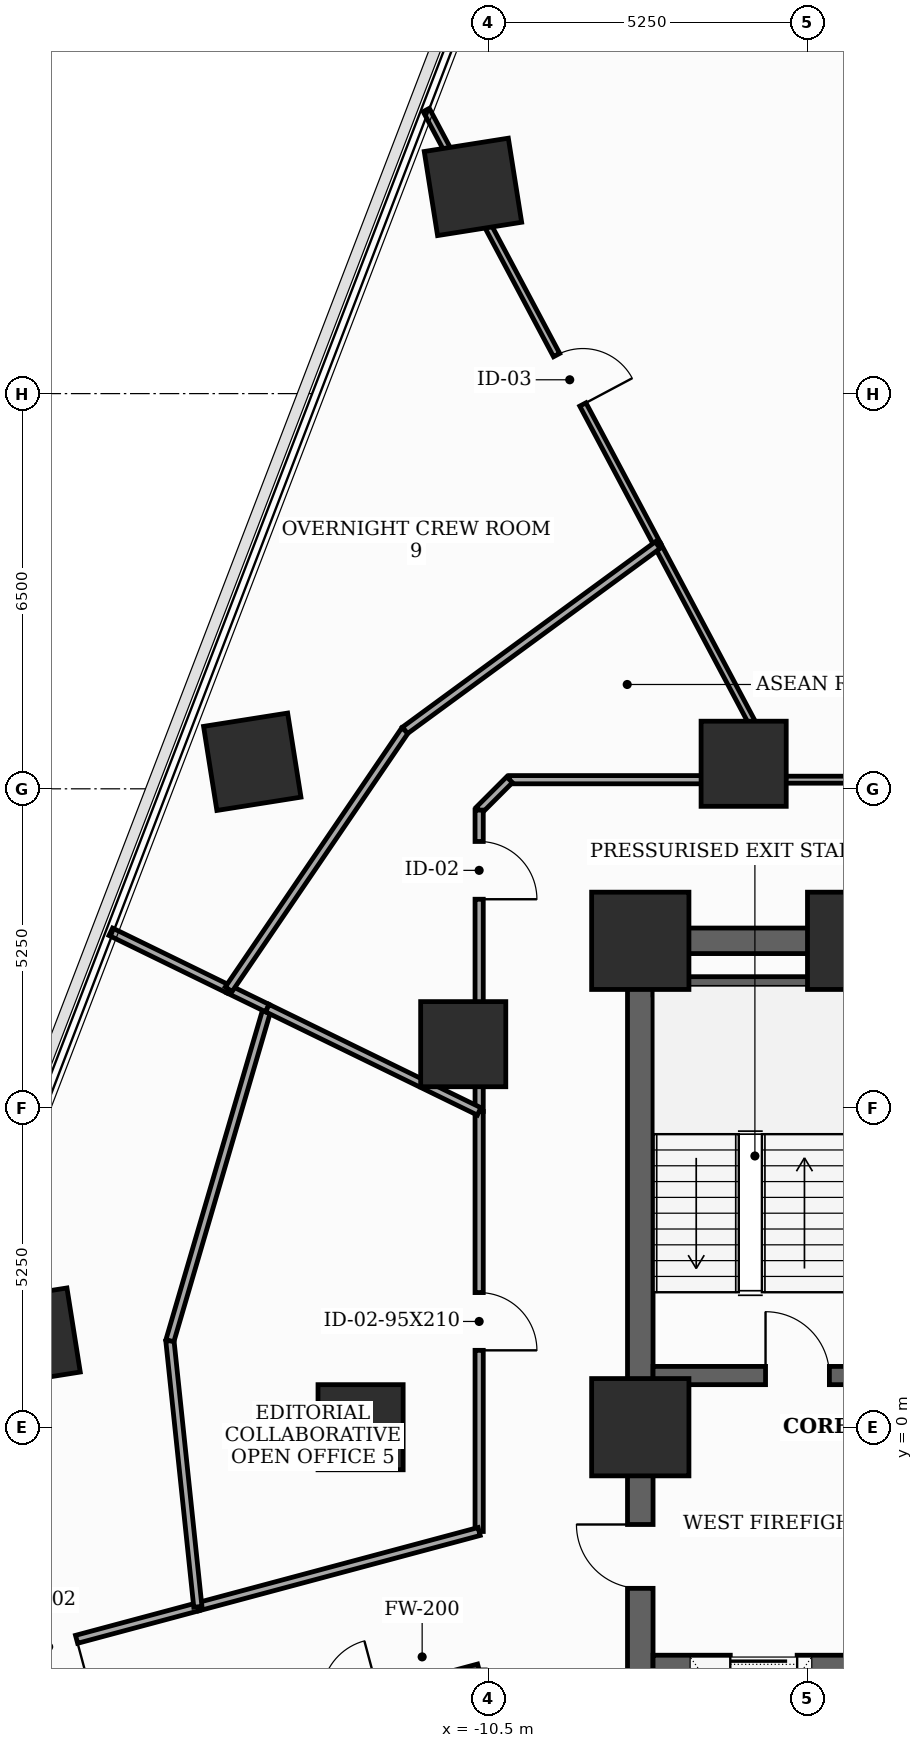
"""IFC4 building model, lengths in metres.
Left out: names, types, materials, properties, quantities, classifications, styles, units other than length and angle.
Written with IfcOpenShell. Run it as: python <this file> out.ifc"""

import sys

from ifc_helpers import new_model, si_unit, direction, frame, frame_2d, origin, origin_2d, place, context, subcontext, project, spatial, rectangle, extrude, element, fill, save


model = new_model("IFC4")
c1 = context("Model", 3, precision=1e-05, world=origin(), true_north=direction((0.0, 1.0)))
c2 = subcontext(c1, "Body", "Model", "MODEL_VIEW")
j1 = project(units=[si_unit("LENGTHUNIT", "METRE"), si_unit("PLANEANGLEUNIT", "RADIAN")], contexts=[c1])
p1 = place(None, origin())
s1 = spatial("IfcSite", under=j1, at=p1, CompositionType="ELEMENT")
p2 = place(p1, origin())
s2 = spatial("IfcBuilding", under=s1, at=p2, CompositionType="ELEMENT")
p3 = place(p2, frame((0.0, 0.0, 81.5)))
s3 = spatial("IfcBuildingStorey", under=s2, at=p3, CompositionType="ELEMENT", Elevation=81.5)
for number, where, z_axis, x_axis in (
    (1, (-4.45, 8.0, 0.0), (0.0, 0.0, 1.0), (1.0, 0.0, 0.0)),
    (2, (-8.0, 8.0, 0.0), (0.0, 0.0, 1.0), (1.0, 0.0, 0.0)),
    (3, (-8.0, 0.0, 0.0), (0.0, 0.0, 1.0), (1.0, 0.0, 0.0)),
):
    element("IfcColumn", number, at=place(p3, frame(where, z_axis=z_axis, x_axis=x_axis)), inside=s3, PredefinedType="COLUMN", context=c2, shape_type="SweptSolid", body=[
        extrude(rectangle(XDim=1.6, YDim=1.6, at=origin_2d()), origin(), (0.0, 0.0, 1.0), 3.7),
    ])
for number, where, z_axis, x_axis in (
    (4, (-6.3, 10.912, 0.0), (0.0, 0.0, 1.0), (1.0, 0.0, 0.0)),
    (5, (-10.912, 6.3, 0.0), (0.0, 0.0, 1.0), (1.0, 0.0, 0.0)),
    (6, (-12.6, 0.0, 0.0), (0.0, 0.0, 1.0), (1.0, 0.0, 0.0)),
    (7, (-10.752, 20.4, 0.0), (0.0, 0.0, 1.0), (0.988, 0.156, 0.0)),
    (8, (-14.381, 10.945, 0.0), (0.0, 0.0, 1.0), (0.988, 0.156, 0.0)),
    (9, (-18.011, 1.49, 0.0), (0.0, 0.0, 1.0), (0.988, 0.156, 0.0)),
):
    element("IfcColumn", number, at=place(p3, frame(where, z_axis=z_axis, x_axis=x_axis)), inside=s3, PredefinedType="COLUMN", context=c2, shape_type="SweptSolid", body=[
        extrude(rectangle(XDim=1.4, YDim=1.4, at=origin_2d()), origin(), (0.0, 0.0, 1.0), 3.7),
    ])
p4 = place(p3, frame((-8.0, -8.0, 0.0), z_axis=(0.0, 0.0, 1.0), x_axis=(0.0, 1.0, 0.0)))
e10 = element("IfcWall", 10, at=p4, inside=s3, PredefinedType="SHEAR", context=c2, shape_type="SweptSolid", body=[
    extrude(rectangle(XDim=16.0, YDim=0.42, at=frame_2d((8.0, 0.0))), origin(), (0.0, 0.0, 1.0), 3.46),
])
p5 = place(p4, frame((1.002, 0.0, 0.0)))
e11 = element("IfcOpeningElement", 11, at=p5, cuts=e10, PredefinedType="OPENING", context=c2, shape_type="SweptSolid", body=[
    extrude(rectangle(XDim=0.85, YDim=2.02, at=frame_2d((0.425, 1.01))), frame((0.0, 0.22, 0.0), z_axis=(0.0, -1.0, 0.0), x_axis=(1.0, 0.0, 0.0)), (0.0, 0.0, 1.0), 0.44),
])
p6 = place(p4, frame((5.35, 0.0, 0.0)))
e12 = element("IfcOpeningElement", 12, at=p6, cuts=e10, PredefinedType="OPENING", context=c2, shape_type="SweptSolid", body=[
    extrude(rectangle(XDim=1.05, YDim=2.15, at=frame_2d((0.525, 1.075))), frame((0.0, 0.22, 0.0), z_axis=(0.0, -1.0, 0.0), x_axis=(1.0, 0.0, 0.0)), (0.0, 0.0, 1.0), 0.44),
])
p7 = place(p3, frame((-8.0, 8.0, 0.0), z_axis=(0.0, 0.0, 1.0), x_axis=(1.0, 0.0, 0.0)))
e13 = element("IfcWall", 13, at=p7, inside=s3, PredefinedType="SHEAR", context=c2, shape_type="SweptSolid", body=[
    extrude(rectangle(XDim=16.0, YDim=0.42, at=frame_2d((8.0, 0.0))), origin(), (0.0, 0.0, 1.0), 3.46),
])
p8 = place(p7, frame((7.1, 0.0, 0.0)))
e14 = element("IfcOpeningElement", 14, at=p8, cuts=e13, PredefinedType="OPENING", context=c2, shape_type="SweptSolid", body=[
    extrude(rectangle(XDim=1.8, YDim=2.15, at=frame_2d((0.9, 1.075))), frame((0.0, 0.22, 0.0), z_axis=(0.0, -1.0, 0.0), x_axis=(1.0, 0.0, 0.0)), (0.0, 0.0, 1.0), 0.44),
])
p9 = place(p3, frame((-7.79, 0.85, 0.0), z_axis=(0.0, 0.0, 1.0), x_axis=(1.0, 0.0, 0.0)))
e15 = element("IfcWall", 15, at=p9, inside=s3, PredefinedType="SHEAR", context=c2, shape_type="SweptSolid", body=[
    extrude(rectangle(XDim=3.34, YDim=0.3, at=frame_2d((1.67, 0.0))), origin(), (0.0, 0.0, 1.0), 3.46),
])
p10 = place(p9, frame((1.85, 0.0, 0.0)))
e16 = element("IfcOpeningElement", 16, at=p10, cuts=e15, PredefinedType="OPENING", context=c2, shape_type="SweptSolid", body=[
    extrude(rectangle(XDim=1.05, YDim=2.15, at=frame_2d((0.525, 1.075))), frame((0.0, 0.16, 0.0), z_axis=(0.0, -1.0, 0.0), x_axis=(1.0, 0.0, 0.0)), (0.0, 0.0, 1.0), 0.32),
])
p11 = place(p3, frame((-7.79, 7.26, 0.0), z_axis=(0.0, 0.0, 1.0), x_axis=(1.0, 0.0, 0.0)))
e17 = element("IfcWall", 17, at=p11, inside=s3, PredefinedType="SHEAR", context=c2, shape_type="SweptSolid", body=[
    extrude(rectangle(XDim=3.34, YDim=0.3, at=frame_2d((1.67, 0.0))), origin(), (0.0, 0.0, 1.0), 3.46),
])
p12 = place(p3, frame((-7.79, -3.9, 0.0), z_axis=(0.0, 0.0, 1.0), x_axis=(1.0, 0.0, 0.0)))
e18 = element("IfcWall", 18, at=p12, inside=s3, PredefinedType="SHEAR", context=c2, shape_type="SweptSolid", body=[
    extrude(rectangle(XDim=3.34, YDim=0.3, at=frame_2d((1.67, 0.0))), origin(), (0.0, 0.0, 1.0), 3.46),
])
p13 = place(p12, frame((1.27, 0.0, 0.0)))
e19 = element("IfcOpeningElement", 19, at=p13, cuts=e18, PredefinedType="OPENING", context=c2, shape_type="SweptSolid", body=[
    extrude(rectangle(XDim=1.1, YDim=2.1, at=frame_2d((0.55, 1.05))), frame((0.0, 0.16, 0.0), z_axis=(0.0, -1.0, 0.0), x_axis=(1.0, 0.0, 0.0)), (0.0, 0.0, 1.0), 0.32),
])
p14 = place(p3, frame((1.715, 10.65, 0.0), z_axis=(0.0, 0.0, 1.0), x_axis=(-1.0, 0.0, 0.0)))
e20 = element("IfcWall", 20, at=p14, inside=s3, PredefinedType="PARTITIONING", context=c2, shape_type="SweptSolid", body=[
    extrude(rectangle(XDim=7.378, YDim=0.115, at=frame_2d((3.689, 0.0))), origin(), (0.0, 0.0, 1.0), 2.745),
])
p15 = place(p3, frame((-14.851, -5.118, 0.0), z_axis=(0.0, 0.0, 1.0), x_axis=(0.965909963178, 0.258878239783, 0.0)))
e21 = element("IfcWall", 21, at=p15, inside=s3, PredefinedType="SOLIDWALL", context=c2, shape_type="SweptSolid", body=[
    extrude(rectangle(XDim=4.349, YDim=0.2, at=frame_2d((2.175, 0.0))), origin(), (0.0, 0.0, 1.0), 2.745),
])
p16 = place(p15, frame((1.7, 0.0, 0.0)))
e22 = element("IfcOpeningElement", 22, at=p16, cuts=e21, PredefinedType="OPENING", context=c2, shape_type="SweptSolid", body=[
    extrude(rectangle(XDim=0.95, YDim=2.1, at=frame_2d((0.475, 1.05))), frame((0.0, 0.11, 0.0), z_axis=(0.0, -1.0, 0.0), x_axis=(1.0, 0.0, 0.0)), (0.0, 0.0, 1.0), 0.22),
])
p17 = place(p3, frame((-15.276, -2.954, 0.0), z_axis=(0.0, 0.0, 1.0), x_axis=(-0.965923168362, -0.258828964418, 0.0)))
e23 = element("IfcWall", 23, at=p17, inside=s3, PredefinedType="PARTITIONING", context=c2, shape_type="SweptSolid", body=[
    extrude(rectangle(XDim=5.08, YDim=0.135, at=frame_2d((2.54, 0.0))), origin(), (0.0, 0.0, 1.0), 2.045),
])
p18 = place(p17, frame((2.065, 0.0, 0.0)))
e24 = element("IfcOpeningElement", 24, at=p18, cuts=e23, PredefinedType="OPENING", context=c2, shape_type="SweptSolid", body=[
    extrude(rectangle(XDim=0.95, YDim=2.0, at=frame_2d((0.475, 1.0))), frame((0.0, 0.077, 0.0), z_axis=(0.0, -1.0, 0.0), x_axis=(1.0, 0.0, 0.0)), (0.0, 0.0, 1.0), 0.155),
])
p19 = place(p3, frame((-10.65, 5.194, 0.0), z_axis=(0.0, 0.0, 1.0), x_axis=(0.0, -1.0, 0.0)))
e25 = element("IfcWall", 25, at=p19, inside=s3, PredefinedType="PARTITIONING", context=c2, shape_type="SweptSolid", body=[
    extrude(rectangle(XDim=6.909, YDim=0.135, at=frame_2d((3.455, 0.0))), origin(), (0.0, 0.0, 1.0), 2.745),
])
p20 = place(p19, frame((2.979, 0.0, 0.0)))
e26 = element("IfcOpeningElement", 26, at=p20, cuts=e25, PredefinedType="OPENING", context=c2, shape_type="SweptSolid", body=[
    extrude(rectangle(XDim=0.95, YDim=2.1, at=frame_2d((0.475, 1.05))), frame((0.0, 0.077, 0.0), z_axis=(0.0, -1.0, 0.0), x_axis=(1.0, 0.0, 0.0)), (0.0, 0.0, 1.0), 0.155),
])
p21 = place(p3, frame((-10.65, -1.715, 0.0), z_axis=(0.0, 0.0, 1.0), x_axis=(-0.965952601708, -0.258719097196, 0.0)))
e27 = element("IfcWall", 27, at=p21, inside=s3, PredefinedType="PARTITIONING", context=c2, shape_type="SweptSolid", body=[
    extrude(rectangle(XDim=4.789, YDim=0.135, at=frame_2d((2.395, 0.0))), origin(), (0.0, 0.0, 1.0), 2.745),
])
p22 = place(p3, frame((-5.663, 10.65, 0.0), z_axis=(0.0, 0.0, 1.0), x_axis=(-1.0, 0.0, 0.0)))
e28 = element("IfcWall", 28, at=p22, inside=s3, PredefinedType="PARTITIONING", context=c2, shape_type="SweptSolid", body=[
    extrude(rectangle(XDim=4.487, YDim=0.135, at=frame_2d((2.243, 0.0))), origin(), (0.0, 0.0, 1.0), 2.745),
])
p23 = place(p3, frame((-10.15, 10.65, 0.0), z_axis=(0.0, 0.0, 1.0), x_axis=(-0.707106781187, -0.707106781187, 0.0)))
e29 = element("IfcWall", 29, at=p23, inside=s3, PredefinedType="PARTITIONING", context=c2, shape_type="SweptSolid", body=[
    extrude(rectangle(XDim=0.707, YDim=0.135, at=frame_2d((0.354, 0.0))), origin(), (0.0, 0.0, 1.0), 3.46),
])
p24 = place(p3, frame((-10.65, 10.15, 0.0), z_axis=(0.0, 0.0, 1.0), x_axis=(0.0, -1.0, 0.0)))
e30 = element("IfcWall", 30, at=p24, inside=s3, PredefinedType="PARTITIONING", context=c2, shape_type="SweptSolid", body=[
    extrude(rectangle(XDim=4.956, YDim=0.135, at=frame_2d((2.478, 0.0))), origin(), (0.0, 0.0, 1.0), 2.045),
])
p25 = place(p24, frame((0.516, 0.0, 0.0)))
e31 = element("IfcOpeningElement", 31, at=p25, cuts=e30, PredefinedType="OPENING", context=c2, shape_type="SweptSolid", body=[
    extrude(rectangle(XDim=0.95, YDim=2.0, at=frame_2d((0.475, 1.0))), frame((0.0, 0.077, 0.0), z_axis=(0.0, -1.0, 0.0), x_axis=(1.0, 0.0, 0.0)), (0.0, 0.0, 1.0), 0.155),
])
p26 = place(p3, frame((-11.52, 21.665, 0.0), z_axis=(0.0, 0.0, 1.0), x_axis=(0.469518559383, -0.88292260272, 0.0)))
e32 = element("IfcWall", 32, at=p26, inside=s3, PredefinedType="PARTITIONING", context=c2, shape_type="SweptSolid", body=[
    extrude(rectangle(XDim=8.105, YDim=0.115, at=frame_2d((4.053, 0.0))), origin(), (0.0, 0.0, 1.0), 2.045),
])
p27 = place(p26, frame((4.565, 0.0, 0.0)))
e33 = element("IfcOpeningElement", 33, at=p27, cuts=e32, PredefinedType="OPENING", context=c2, shape_type="SweptSolid", body=[
    extrude(rectangle(XDim=0.92, YDim=2.0, at=frame_2d((0.46, 1.0))), frame((0.0, 0.067, 0.0), z_axis=(0.0, -1.0, 0.0), x_axis=(1.0, 0.0, 0.0)), (0.0, 0.0, 1.0), 0.135),
])
p28 = place(p3, frame((-7.714, 14.508, 0.0), z_axis=(0.0, 0.0, 1.0), x_axis=(0.469401685306, -0.882984743827, 0.0)))
e34 = element("IfcWall", 34, at=p28, inside=s3, PredefinedType="PARTITIONING", context=c2, shape_type="SweptSolid", body=[
    extrude(rectangle(XDim=4.369, YDim=0.115, at=frame_2d((2.185, 0.0))), origin(), (0.0, 0.0, 1.0), 2.045),
])
p29 = place(p3, frame((-15.276, -2.954, 0.0), z_axis=(0.0, 0.0, 1.0), x_axis=(-0.104560622475, 0.994518514774, 0.0)))
e35 = element("IfcWall", 35, at=p29, inside=s3, PredefinedType="PARTITIONING", context=c2, shape_type="SweptSolid", body=[
    extrude(rectangle(XDim=4.401, YDim=0.135, at=frame_2d((2.201, 0.0))), origin(), (0.0, 0.0, 1.0), 2.045),
])
p30 = place(p3, frame((-15.736, 1.423, 0.0), z_axis=(0.0, 0.0, 1.0), x_axis=(0.281231672123, 0.959639904649, 0.0)))
e36 = element("IfcWall", 36, at=p30, inside=s3, PredefinedType="PARTITIONING", context=c2, shape_type="SweptSolid", body=[
    extrude(rectangle(XDim=5.7, YDim=0.135, at=frame_2d((2.85, 0.0))), origin(), (0.0, 0.0, 1.0), 3.46),
])
p31 = place(p3, frame((-14.769, 7.203, 0.0), z_axis=(0.0, 0.0, 1.0), x_axis=(-0.898774971292, 0.438410254191, 0.0)))
e37 = element("IfcWall", 37, at=p31, inside=s3, PredefinedType="PARTITIONING", context=c2, shape_type="SweptSolid", body=[
    extrude(rectangle(XDim=2.157, YDim=0.135, at=frame_2d((1.079, 0.0))), origin(), (0.0, 0.0, 1.0), 2.045),
])
p32 = place(p3, frame((-14.133, 6.893, 0.0), z_axis=(0.0, 0.0, 1.0), x_axis=(-0.899003804691, 0.437940816949, 0.0)))
e38 = element("IfcWall", 38, at=p32, inside=s3, PredefinedType="PARTITIONING", context=c2, shape_type="SweptSolid", body=[
    extrude(rectangle(XDim=0.708, YDim=0.135, at=frame_2d((0.354, 0.0))), origin(), (0.0, 0.0, 1.0), 3.46),
])
p33 = place(p3, frame((-10.65, 5.194, 0.0), z_axis=(0.0, 0.0, 1.0), x_axis=(-0.898781159743, 0.438397567159, 0.0)))
e39 = element("IfcWall", 39, at=p33, inside=s3, PredefinedType="PARTITIONING", context=c2, shape_type="SweptSolid", body=[
    extrude(rectangle(XDim=3.875, YDim=0.135, at=frame_2d((1.938, 0.0))), origin(), (0.0, 0.0, 1.0), 2.745),
])
p34 = place(p3, frame((-14.769, 7.203, 0.0), z_axis=(0.0, 0.0, 1.0), x_axis=(0.562841259026, 0.826565010836, 0.0)))
e40 = element("IfcWall", 40, at=p34, inside=s3, PredefinedType="PARTITIONING", context=c2, shape_type="SweptSolid", body=[
    extrude(rectangle(XDim=5.153, YDim=0.135, at=frame_2d((2.576, 0.0))), origin(), (0.0, 0.0, 1.0), 2.045),
])
p35 = place(p3, frame((-11.869, 11.462, 0.0), z_axis=(0.0, 0.0, 1.0), x_axis=(0.806469774548, 0.5912753189, 0.0)))
e41 = element("IfcWall", 41, at=p35, inside=s3, PredefinedType="PARTITIONING", context=c2, shape_type="SweptSolid", body=[
    extrude(rectangle(XDim=5.152, YDim=0.135, at=frame_2d((2.576, 0.0))), origin(), (0.0, 0.0, 1.0), 2.045),
])
p36 = place(p6, origin())
e42 = element("IfcDoor", 42, at=p36, inside=s3, OperationType="SINGLE_SWING_RIGHT", PredefinedType="DOOR", context=c2, shape_type="SweptSolid", body=[
    extrude(rectangle(XDim=1.05, YDim=2.15, at=frame_2d((0.525, 1.075))), frame((0.0, 0.025, 0.0), z_axis=(0.0, -1.0, 0.0), x_axis=(1.0, 0.0, 0.0)), (0.0, 0.0, 1.0), 0.05),
])
fill(e12, e42)
p37 = place(p10, origin())
e43 = element("IfcDoor", 43, at=p37, inside=s3, OperationType="SINGLE_SWING_LEFT", PredefinedType="DOOR", context=c2, shape_type="SweptSolid", body=[
    extrude(rectangle(XDim=1.05, YDim=2.15, at=frame_2d((0.525, 1.075))), frame((0.0, 0.025, 0.0), z_axis=(0.0, -1.0, 0.0), x_axis=(1.0, 0.0, 0.0)), (0.0, 0.0, 1.0), 0.05),
])
fill(e16, e43)
p38 = place(p13, origin())
e44 = element("IfcDoor", 44, at=p38, inside=s3, OperationType="SLIDING_TO_LEFT", PredefinedType="DOOR", context=c2, shape_type="SweptSolid", body=[
    extrude(rectangle(XDim=1.1, YDim=2.1, at=frame_2d((0.55, 1.05))), frame((0.0, 0.025, 0.0), z_axis=(0.0, -1.0, 0.0), x_axis=(1.0, 0.0, 0.0)), (0.0, 0.0, 1.0), 0.05),
])
fill(e19, e44)
p39 = place(p18, origin())
e45 = element("IfcDoor", 45, at=p39, inside=s3, OperationType="SINGLE_SWING_LEFT", PredefinedType="DOOR", context=c2, shape_type="SweptSolid", body=[
    extrude(rectangle(XDim=0.95, YDim=2.0, at=frame_2d((0.475, 1.0))), frame((0.0, 0.025, 0.0), z_axis=(0.0, -1.0, 0.0), x_axis=(1.0, 0.0, 0.0)), (0.0, 0.0, 1.0), 0.05),
])
fill(e24, e45)
p40 = place(p20, origin())
e46 = element("IfcDoor", 46, at=p40, inside=s3, OperationType="SINGLE_SWING_RIGHT", PredefinedType="DOOR", context=c2, shape_type="SweptSolid", body=[
    extrude(rectangle(XDim=0.95, YDim=2.1, at=frame_2d((0.475, 1.05))), frame((0.0, 0.025, 0.0), z_axis=(0.0, -1.0, 0.0), x_axis=(1.0, 0.0, 0.0)), (0.0, 0.0, 1.0), 0.05),
])
fill(e26, e46)
p41 = place(p25, origin())
e47 = element("IfcDoor", 47, at=p41, inside=s3, OperationType="SINGLE_SWING_RIGHT", PredefinedType="DOOR", context=c2, shape_type="SweptSolid", body=[
    extrude(rectangle(XDim=0.95, YDim=2.0, at=frame_2d((0.475, 1.0))), frame((0.0, 0.025, 0.0), z_axis=(0.0, -1.0, 0.0), x_axis=(1.0, 0.0, 0.0)), (0.0, 0.0, 1.0), 0.05),
])
fill(e31, e47)
p42 = place(p27, origin())
e48 = element("IfcDoor", 48, at=p42, inside=s3, OperationType="SINGLE_SWING_RIGHT", PredefinedType="DOOR", context=c2, shape_type="SweptSolid", body=[
    extrude(rectangle(XDim=0.92, YDim=2.0, at=frame_2d((0.46, 1.0))), frame((0.0, 0.025, 0.0), z_axis=(0.0, -1.0, 0.0), x_axis=(1.0, 0.0, 0.0)), (0.0, 0.0, 1.0), 0.05),
])
fill(e33, e48)
save(model, sys.argv[1])
